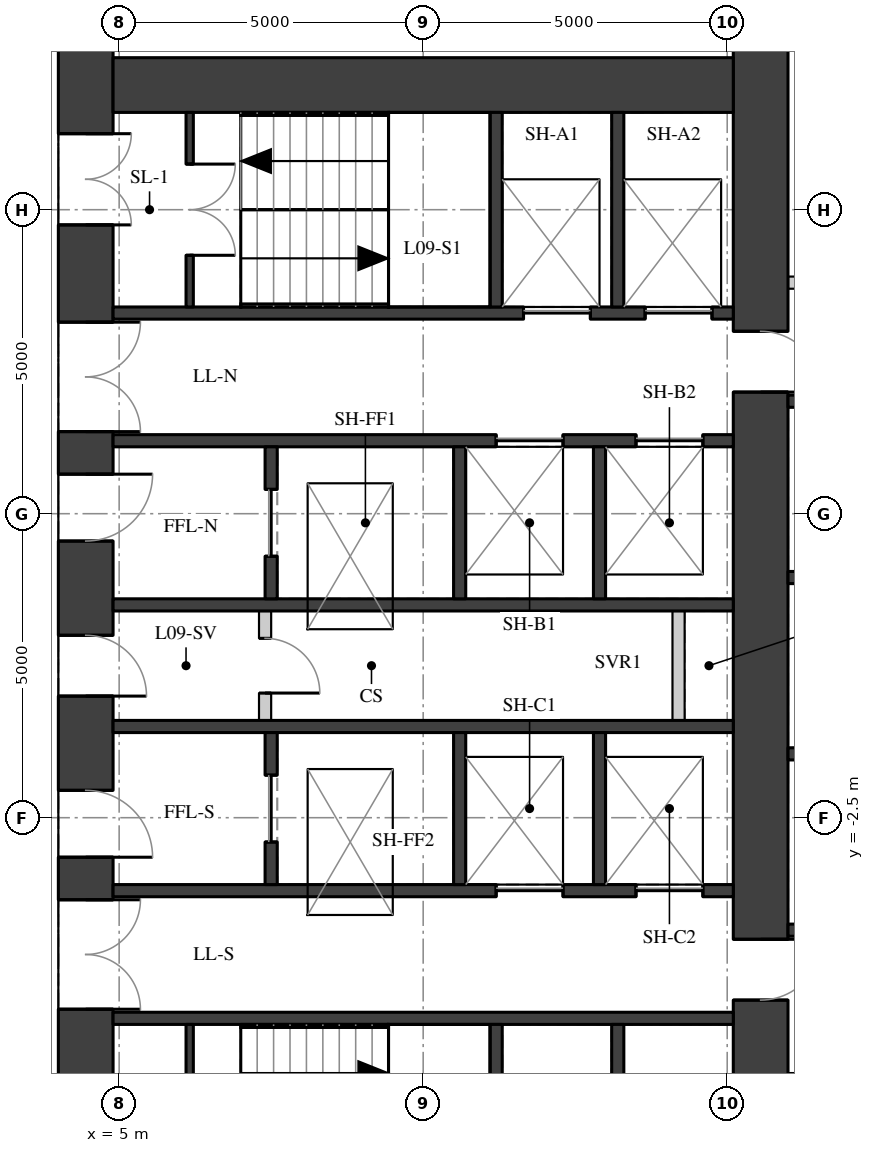
"""IFC4 building model, lengths in metres.
Left out: names, types, materials, properties, quantities, classifications, styles, units other than length and angle.
Written with IfcOpenShell. Run it as: python <this file> out.ifc"""

import sys

from ifc_helpers import new_model, si_unit, direction, frame, frame_2d, origin, place, context, subcontext, project, spatial, rectangle, extrude, element, fill, save


model = new_model("IFC4")
c1 = context("Model", 3, precision=1e-05, world=origin(), true_north=direction((0.0, 1.0)))
c2 = subcontext(c1, "Body", "Model", "MODEL_VIEW")
j1 = project(units=[si_unit("LENGTHUNIT", "METRE"), si_unit("PLANEANGLEUNIT", "RADIAN")], contexts=[c1])
p1 = place(None, origin())
s1 = spatial("IfcSite", under=j1, at=p1, CompositionType="ELEMENT")
p2 = place(p1, origin())
s2 = spatial("IfcBuilding", under=s1, at=p2, CompositionType="ELEMENT")
p3 = place(p2, frame((0.0, 0.0, 38.2)))
s3 = spatial("IfcBuildingStorey", under=s2, at=p3, CompositionType="ELEMENT", Elevation=38.2)
p4 = place(p3, frame((4.45, -11.1, 0.0), z_axis=(0.0, 0.0, 1.0), x_axis=(0.0, 1.0, 0.0)))
e1 = element("IfcWall", 1, at=p4, inside=s3, PredefinedType="SHEAR", context=c2, shape_type="SweptSolid", body=[
    extrude(rectangle(XDim=22.2, YDim=0.9, at=frame_2d((11.1, 0.0))), origin(), (0.0, 0.0, 1.0), 3.02),
])
p5 = place(p4, frame((2.35, 0.0, 0.0)))
e2 = element("IfcOpeningElement", 2, at=p5, cuts=e1, PredefinedType="OPENING", context=c2, shape_type="SweptSolid", body=[
    extrude(rectangle(XDim=1.5, YDim=2.1, at=frame_2d((0.75, 1.05))), frame((0.0, 0.46, 0.0), z_axis=(0.0, -1.0, 0.0), x_axis=(1.0, 0.0, 0.0)), (0.0, 0.0, 1.0), 0.92),
])
p6 = place(p4, frame((5.45, 0.0, 0.0)))
e3 = element("IfcOpeningElement", 3, at=p6, cuts=e1, PredefinedType="OPENING", context=c2, shape_type="SweptSolid", body=[
    extrude(rectangle(XDim=1.8, YDim=2.1, at=frame_2d((0.9, 1.05))), frame((0.0, 0.46, 0.0), z_axis=(0.0, -1.0, 0.0), x_axis=(1.0, 0.0, 0.0)), (0.0, 0.0, 1.0), 0.92),
])
p7 = place(p4, frame((7.95, 0.0, 0.0)))
e4 = element("IfcOpeningElement", 4, at=p7, cuts=e1, PredefinedType="OPENING", context=c2, shape_type="SweptSolid", body=[
    extrude(rectangle(XDim=1.1, YDim=2.1, at=frame_2d((0.55, 1.05))), frame((0.0, 0.46, 0.0), z_axis=(0.0, -1.0, 0.0), x_axis=(1.0, 0.0, 0.0)), (0.0, 0.0, 1.0), 0.92),
])
p8 = place(p4, frame((10.6, 0.0, 0.0)))
e5 = element("IfcOpeningElement", 5, at=p8, cuts=e1, PredefinedType="OPENING", context=c2, shape_type="SweptSolid", body=[
    extrude(rectangle(XDim=1.0, YDim=2.1, at=frame_2d((0.5, 1.05))), frame((0.0, 0.46, 0.0), z_axis=(0.0, -1.0, 0.0), x_axis=(1.0, 0.0, 0.0)), (0.0, 0.0, 1.0), 0.92),
])
p9 = place(p4, frame((13.15, 0.0, 0.0)))
e6 = element("IfcOpeningElement", 6, at=p9, cuts=e1, PredefinedType="OPENING", context=c2, shape_type="SweptSolid", body=[
    extrude(rectangle(XDim=1.1, YDim=2.1, at=frame_2d((0.55, 1.05))), frame((0.0, 0.46, 0.0), z_axis=(0.0, -1.0, 0.0), x_axis=(1.0, 0.0, 0.0)), (0.0, 0.0, 1.0), 0.92),
])
p10 = place(p4, frame((14.95, 0.0, 0.0)))
e7 = element("IfcOpeningElement", 7, at=p10, cuts=e1, PredefinedType="OPENING", context=c2, shape_type="SweptSolid", body=[
    extrude(rectangle(XDim=1.8, YDim=2.1, at=frame_2d((0.9, 1.05))), frame((0.0, 0.46, 0.0), z_axis=(0.0, -1.0, 0.0), x_axis=(1.0, 0.0, 0.0)), (0.0, 0.0, 1.0), 0.92),
])
p11 = place(p4, frame((18.35, 0.0, 0.0)))
e8 = element("IfcOpeningElement", 8, at=p11, cuts=e1, PredefinedType="OPENING", context=c2, shape_type="SweptSolid", body=[
    extrude(rectangle(XDim=1.5, YDim=2.1, at=frame_2d((0.75, 1.05))), frame((0.0, 0.46, 0.0), z_axis=(0.0, -1.0, 0.0), x_axis=(1.0, 0.0, 0.0)), (0.0, 0.0, 1.0), 0.92),
])
p12 = place(p3, frame((15.55, -11.1, 0.0), z_axis=(0.0, 0.0, 1.0), x_axis=(0.0, 1.0, 0.0)))
e9 = element("IfcWall", 9, at=p12, inside=s3, PredefinedType="SHEAR", context=c2, shape_type="SweptSolid", body=[
    extrude(rectangle(XDim=22.2, YDim=0.9, at=frame_2d((11.1, 0.0))), origin(), (0.0, 0.0, 1.0), 3.02),
])
p13 = place(p12, frame((15.6, 0.0, 0.0)))
e10 = element("IfcOpeningElement", 10, at=p13, cuts=e9, PredefinedType="OPENING", context=c2, shape_type="SweptSolid", body=[
    extrude(rectangle(XDim=1.0, YDim=2.1, at=frame_2d((0.5, 1.05))), frame((0.0, 0.46, 0.0), z_axis=(0.0, -1.0, 0.0), x_axis=(1.0, 0.0, 0.0)), (0.0, 0.0, 1.0), 0.92),
])
p14 = place(p12, frame((5.6, 0.0, 0.0)))
e11 = element("IfcOpeningElement", 11, at=p14, cuts=e9, PredefinedType="OPENING", context=c2, shape_type="SweptSolid", body=[
    extrude(rectangle(XDim=1.0, YDim=2.1, at=frame_2d((0.5, 1.05))), frame((0.0, 0.46, 0.0), z_axis=(0.0, -1.0, 0.0), x_axis=(1.0, 0.0, 0.0)), (0.0, 0.0, 1.0), 0.92),
])
p15 = place(p3, frame((4.9, 9.55, 0.0), z_axis=(0.0, 0.0, 1.0), x_axis=(1.0, 0.0, 0.0)))
e12 = element("IfcWall", 12, at=p15, inside=s3, PredefinedType="SHEAR", context=c2, shape_type="SweptSolid", body=[
    extrude(rectangle(XDim=10.2, YDim=0.9, at=frame_2d((5.1, 0.0))), origin(), (0.0, 0.0, 1.0), 3.02),
])
p16 = place(p3, frame((4.9, 5.8, 0.0), z_axis=(0.0, 0.0, 1.0), x_axis=(1.0, 0.0, 0.0)))
e13 = element("IfcWall", 13, at=p16, inside=s3, PredefinedType="SHEAR", context=c2, shape_type="SweptSolid", body=[
    extrude(rectangle(XDim=10.2, YDim=0.2, at=frame_2d((5.1, 0.0))), origin(), (0.0, 0.0, 1.0), 3.02),
])
p17 = place(p16, frame((6.75, 0.0, 0.0)))
e14 = element("IfcOpeningElement", 14, at=p17, cuts=e13, PredefinedType="OPENING", context=c2, shape_type="SweptSolid", body=[
    extrude(rectangle(XDim=1.1, YDim=2.1, at=frame_2d((0.55, 1.05))), frame((0.0, 0.11, 0.0), z_axis=(0.0, -1.0, 0.0), x_axis=(1.0, 0.0, 0.0)), (0.0, 0.0, 1.0), 0.22),
])
p18 = place(p16, frame((8.75, 0.0, 0.0)))
e15 = element("IfcOpeningElement", 15, at=p18, cuts=e13, PredefinedType="OPENING", context=c2, shape_type="SweptSolid", body=[
    extrude(rectangle(XDim=1.1, YDim=2.1, at=frame_2d((0.55, 1.05))), frame((0.0, 0.11, 0.0), z_axis=(0.0, -1.0, 0.0), x_axis=(1.0, 0.0, 0.0)), (0.0, 0.0, 1.0), 0.22),
])
p19 = place(p3, frame((4.9, 3.7, 0.0), z_axis=(0.0, 0.0, 1.0), x_axis=(1.0, 0.0, 0.0)))
e16 = element("IfcWall", 16, at=p19, inside=s3, PredefinedType="SHEAR", context=c2, shape_type="SweptSolid", body=[
    extrude(rectangle(XDim=10.2, YDim=0.2, at=frame_2d((5.1, 0.0))), origin(), (0.0, 0.0, 1.0), 3.02),
])
p20 = place(p19, frame((6.3, 0.0, 0.0)))
e17 = element("IfcOpeningElement", 17, at=p20, cuts=e16, PredefinedType="OPENING", context=c2, shape_type="SweptSolid", body=[
    extrude(rectangle(XDim=1.1, YDim=2.1, at=frame_2d((0.55, 1.05))), frame((0.0, 0.11, 0.0), z_axis=(0.0, -1.0, 0.0), x_axis=(1.0, 0.0, 0.0)), (0.0, 0.0, 1.0), 0.22),
])
p21 = place(p19, frame((8.6, 0.0, 0.0)))
e18 = element("IfcOpeningElement", 18, at=p21, cuts=e16, PredefinedType="OPENING", context=c2, shape_type="SweptSolid", body=[
    extrude(rectangle(XDim=1.1, YDim=2.1, at=frame_2d((0.55, 1.05))), frame((0.0, 0.11, 0.0), z_axis=(0.0, -1.0, 0.0), x_axis=(1.0, 0.0, 0.0)), (0.0, 0.0, 1.0), 0.22),
])
for number, where, z_axis, x_axis in (
    (19, (4.9, 1.0, 0.0), (0.0, 0.0, 1.0), (1.0, 0.0, 0.0)),
    (20, (4.9, -1.0, 0.0), (0.0, 0.0, 1.0), (1.0, 0.0, 0.0)),
):
    element("IfcWall", number, at=place(p3, frame(where, z_axis=z_axis, x_axis=x_axis)), inside=s3, PredefinedType="SHEAR", context=c2, shape_type="SweptSolid", body=[
        extrude(rectangle(XDim=10.2, YDim=0.2, at=frame_2d((5.1, 0.0))), origin(), (0.0, 0.0, 1.0), 3.02),
    ])
p22 = place(p3, frame((4.9, -3.7, 0.0), z_axis=(0.0, 0.0, 1.0), x_axis=(1.0, 0.0, 0.0)))
e21 = element("IfcWall", 21, at=p22, inside=s3, PredefinedType="SHEAR", context=c2, shape_type="SweptSolid", body=[
    extrude(rectangle(XDim=10.2, YDim=0.2, at=frame_2d((5.1, 0.0))), origin(), (0.0, 0.0, 1.0), 3.02),
])
p23 = place(p22, frame((6.3, 0.0, 0.0)))
e22 = element("IfcOpeningElement", 22, at=p23, cuts=e21, PredefinedType="OPENING", context=c2, shape_type="SweptSolid", body=[
    extrude(rectangle(XDim=1.1, YDim=2.1, at=frame_2d((0.55, 1.05))), frame((0.0, 0.11, 0.0), z_axis=(0.0, -1.0, 0.0), x_axis=(1.0, 0.0, 0.0)), (0.0, 0.0, 1.0), 0.22),
])
p24 = place(p22, frame((8.6, 0.0, 0.0)))
e23 = element("IfcOpeningElement", 23, at=p24, cuts=e21, PredefinedType="OPENING", context=c2, shape_type="SweptSolid", body=[
    extrude(rectangle(XDim=1.1, YDim=2.1, at=frame_2d((0.55, 1.05))), frame((0.0, 0.11, 0.0), z_axis=(0.0, -1.0, 0.0), x_axis=(1.0, 0.0, 0.0)), (0.0, 0.0, 1.0), 0.22),
])
p25 = place(p3, frame((4.9, -5.8, 0.0), z_axis=(0.0, 0.0, 1.0), x_axis=(1.0, 0.0, 0.0)))
e24 = element("IfcWall", 24, at=p25, inside=s3, PredefinedType="SHEAR", context=c2, shape_type="SweptSolid", body=[
    extrude(rectangle(XDim=10.2, YDim=0.2, at=frame_2d((5.1, 0.0))), origin(), (0.0, 0.0, 1.0), 3.02),
])
for number, where, z_axis, x_axis in (
    (25, (11.2, 5.9, 0.0), (0.0, 0.0, 1.0), (0.0, 1.0, 0.0)),
    (26, (11.2, -9.1, 0.0), (0.0, 0.0, 1.0), (0.0, 1.0, 0.0)),
    (27, (13.2, 5.9, 0.0), (0.0, 0.0, 1.0), (0.0, 1.0, 0.0)),
    (28, (13.2, -9.1, 0.0), (0.0, 0.0, 1.0), (0.0, 1.0, 0.0)),
):
    element("IfcWall", number, at=place(p3, frame(where, z_axis=z_axis, x_axis=x_axis)), inside=s3, PredefinedType="SHEAR", context=c2, shape_type="SweptSolid", body=[
        extrude(rectangle(XDim=3.2, YDim=0.2, at=frame_2d((1.6, 0.0))), origin(), (0.0, 0.0, 1.0), 3.02),
    ])
p26 = place(p3, frame((7.5, 1.1, 0.0), z_axis=(0.0, 0.0, 1.0), x_axis=(0.0, 1.0, 0.0)))
e29 = element("IfcWall", 29, at=p26, inside=s3, PredefinedType="SHEAR", context=c2, shape_type="SweptSolid", body=[
    extrude(rectangle(XDim=2.5, YDim=0.2, at=frame_2d((1.25, 0.0))), origin(), (0.0, 0.0, 1.0), 3.02),
])
p27 = place(p26, frame((0.7, 0.0, 0.0)))
e30 = element("IfcOpeningElement", 30, at=p27, cuts=e29, PredefinedType="OPENING", context=c2, shape_type="SweptSolid", body=[
    extrude(rectangle(XDim=1.1, YDim=2.1, at=frame_2d((0.55, 1.05))), frame((0.0, 0.11, 0.0), z_axis=(0.0, -1.0, 0.0), x_axis=(1.0, 0.0, 0.0)), (0.0, 0.0, 1.0), 0.22),
])
p28 = place(p3, frame((7.5, -3.6, 0.0), z_axis=(0.0, 0.0, 1.0), x_axis=(0.0, 1.0, 0.0)))
e31 = element("IfcWall", 31, at=p28, inside=s3, PredefinedType="SHEAR", context=c2, shape_type="SweptSolid", body=[
    extrude(rectangle(XDim=2.5, YDim=0.2, at=frame_2d((1.25, 0.0))), origin(), (0.0, 0.0, 1.0), 3.02),
])
p29 = place(p28, frame((0.7, 0.0, 0.0)))
e32 = element("IfcOpeningElement", 32, at=p29, cuts=e31, PredefinedType="OPENING", context=c2, shape_type="SweptSolid", body=[
    extrude(rectangle(XDim=1.1, YDim=2.1, at=frame_2d((0.55, 1.05))), frame((0.0, 0.11, 0.0), z_axis=(0.0, -1.0, 0.0), x_axis=(1.0, 0.0, 0.0)), (0.0, 0.0, 1.0), 0.22),
])
for number, where, z_axis, x_axis in (
    (33, (10.6, 1.1, 0.0), (0.0, 0.0, 1.0), (0.0, 1.0, 0.0)),
    (34, (10.6, -3.6, 0.0), (0.0, 0.0, 1.0), (0.0, 1.0, 0.0)),
    (35, (12.9, 1.1, 0.0), (0.0, 0.0, 1.0), (0.0, 1.0, 0.0)),
    (36, (12.9, -3.6, 0.0), (0.0, 0.0, 1.0), (0.0, 1.0, 0.0)),
):
    element("IfcWall", number, at=place(p3, frame(where, z_axis=z_axis, x_axis=x_axis)), inside=s3, PredefinedType="SHEAR", context=c2, shape_type="SweptSolid", body=[
        extrude(rectangle(XDim=2.5, YDim=0.2, at=frame_2d((1.25, 0.0))), origin(), (0.0, 0.0, 1.0), 3.02),
    ])
p30 = place(p3, frame((6.16, 5.9, 0.0), z_axis=(0.0, 0.0, 1.0), x_axis=(0.0, 1.0, 0.0)))
e37 = element("IfcWall", 37, at=p30, inside=s3, PredefinedType="SHEAR", context=c2, shape_type="SweptSolid", body=[
    extrude(rectangle(XDim=3.2, YDim=0.12, at=frame_2d((1.6, 0.0))), origin(), (0.0, 0.0, 1.0), 3.02),
])
p31 = place(p30, frame((0.85, 0.0, 0.0)))
e38 = element("IfcOpeningElement", 38, at=p31, cuts=e37, PredefinedType="OPENING", context=c2, shape_type="SweptSolid", body=[
    extrude(rectangle(XDim=1.5, YDim=2.1, at=frame_2d((0.75, 1.05))), frame((0.0, 0.07, 0.0), z_axis=(0.0, -1.0, 0.0), x_axis=(1.0, 0.0, 0.0)), (0.0, 0.0, 1.0), 0.14),
])
p32 = place(p3, frame((6.16, -9.1, 0.0), z_axis=(0.0, 0.0, 1.0), x_axis=(0.0, 1.0, 0.0)))
e39 = element("IfcWall", 39, at=p32, inside=s3, PredefinedType="SHEAR", context=c2, shape_type="SweptSolid", body=[
    extrude(rectangle(XDim=3.2, YDim=0.12, at=frame_2d((1.6, 0.0))), origin(), (0.0, 0.0, 1.0), 3.02),
])
p33 = place(p32, frame((0.85, 0.0, 0.0)))
e40 = element("IfcOpeningElement", 40, at=p33, cuts=e39, PredefinedType="OPENING", context=c2, shape_type="SweptSolid", body=[
    extrude(rectangle(XDim=1.5, YDim=2.1, at=frame_2d((0.75, 1.05))), frame((0.0, 0.07, 0.0), z_axis=(0.0, -1.0, 0.0), x_axis=(1.0, 0.0, 0.0)), (0.0, 0.0, 1.0), 0.14),
])
p34 = place(p3, frame((7.4, -0.9, 0.0), z_axis=(0.0, 0.0, 1.0), x_axis=(0.0, 1.0, 0.0)))
e41 = element("IfcWall", 41, at=p34, inside=s3, PredefinedType="PARTITIONING", context=c2, shape_type="SweptSolid", body=[
    extrude(rectangle(XDim=1.8, YDim=0.2, at=frame_2d((0.9, 0.0))), origin(), (0.0, 0.0, 1.0), 3.02),
])
p35 = place(p34, frame((0.45, 0.0, 0.0)))
e42 = element("IfcOpeningElement", 42, at=p35, cuts=e41, PredefinedType="OPENING", context=c2, shape_type="SweptSolid", body=[
    extrude(rectangle(XDim=0.9, YDim=2.1, at=frame_2d((0.45, 1.05))), frame((0.0, 0.11, 0.0), z_axis=(0.0, -1.0, 0.0), x_axis=(1.0, 0.0, 0.0)), (0.0, 0.0, 1.0), 0.22),
])
p36 = place(p3, frame((14.2, -0.9, 0.0), z_axis=(0.0, 0.0, 1.0), x_axis=(0.0, 1.0, 0.0)))
e43 = element("IfcWall", 43, at=p36, inside=s3, PredefinedType="PARTITIONING", context=c2, shape_type="SweptSolid", body=[
    extrude(rectangle(XDim=1.8, YDim=0.2, at=frame_2d((0.9, 0.0))), origin(), (0.0, 0.0, 1.0), 3.02),
])
for number, where, z_axis, x_axis in (
    (44, (16.0, -4.35, 0.0), (0.0, 0.0, 1.0), (1.0, 0.0, 0.0)),
    (45, (16.0, -1.45, 0.0), (0.0, 0.0, 1.0), (1.0, 0.0, 0.0)),
    (46, (16.0, 1.45, 0.0), (0.0, 0.0, 1.0), (1.0, 0.0, 0.0)),
    (47, (16.0, 4.35, 0.0), (0.0, 0.0, 1.0), (1.0, 0.0, 0.0)),
):
    element("IfcWall", number, at=place(p3, frame(where, z_axis=z_axis, x_axis=x_axis)), inside=s3, PredefinedType="SHEAR", context=c2, shape_type="SweptSolid", body=[
        extrude(rectangle(XDim=2.3, YDim=0.2, at=frame_2d((1.15, 0.0))), origin(), (0.0, 0.0, 1.0), 3.02),
    ])
p37 = place(p3, frame((16.0, 6.3, 0.0), z_axis=(0.0, 0.0, 1.0), x_axis=(1.0, 0.0, 0.0)))
e48 = element("IfcWall", 48, at=p37, inside=s3, PredefinedType="PARTITIONING", context=c2, shape_type="SweptSolid", body=[
    extrude(rectangle(XDim=2.3, YDim=0.2, at=frame_2d((1.15, 0.0))), origin(), (0.0, 0.0, 1.0), 3.02),
])
p38 = place(p37, frame((0.3, 0.0, 0.0)))
e49 = element("IfcOpeningElement", 49, at=p38, cuts=e48, PredefinedType="OPENING", context=c2, shape_type="SweptSolid", body=[
    extrude(rectangle(XDim=0.9, YDim=2.1, at=frame_2d((0.45, 1.05))), frame((0.0, 0.11, 0.0), z_axis=(0.0, -1.0, 0.0), x_axis=(1.0, 0.0, 0.0)), (0.0, 0.0, 1.0), 0.22),
])
p39 = place(p6, origin())
e50 = element("IfcDoor", 50, at=p39, inside=s3, OperationType="DOUBLE_DOOR_SINGLE_SWING", PredefinedType="DOOR", context=c2, shape_type="SweptSolid", body=[
    extrude(rectangle(XDim=1.8, YDim=2.1, at=frame_2d((0.9, 1.05))), frame((0.0, 0.025, 0.0), z_axis=(0.0, -1.0, 0.0), x_axis=(1.0, 0.0, 0.0)), (0.0, 0.0, 1.0), 0.05),
])
fill(e3, e50)
p40 = place(p7, origin())
e51 = element("IfcDoor", 51, at=p40, inside=s3, OperationType="SINGLE_SWING_RIGHT", PredefinedType="DOOR", context=c2, shape_type="SweptSolid", body=[
    extrude(rectangle(XDim=1.1, YDim=2.1, at=frame_2d((0.55, 1.05))), frame((0.0, 0.025, 0.0), z_axis=(0.0, -1.0, 0.0), x_axis=(1.0, 0.0, 0.0)), (0.0, 0.0, 1.0), 0.05),
])
fill(e4, e51)
p41 = place(p8, origin())
e52 = element("IfcDoor", 52, at=p41, inside=s3, OperationType="SINGLE_SWING_RIGHT", PredefinedType="DOOR", context=c2, shape_type="SweptSolid", body=[
    extrude(rectangle(XDim=1.0, YDim=2.1, at=frame_2d((0.5, 1.05))), frame((0.0, 0.025, 0.0), z_axis=(0.0, -1.0, 0.0), x_axis=(1.0, 0.0, 0.0)), (0.0, 0.0, 1.0), 0.05),
])
fill(e5, e52)
p42 = place(p9, origin())
e53 = element("IfcDoor", 53, at=p42, inside=s3, OperationType="SINGLE_SWING_LEFT", PredefinedType="DOOR", context=c2, shape_type="SweptSolid", body=[
    extrude(rectangle(XDim=1.1, YDim=2.1, at=frame_2d((0.55, 1.05))), frame((0.0, 0.025, 0.0), z_axis=(0.0, -1.0, 0.0), x_axis=(1.0, 0.0, 0.0)), (0.0, 0.0, 1.0), 0.05),
])
fill(e6, e53)
p43 = place(p10, origin())
e54 = element("IfcDoor", 54, at=p43, inside=s3, OperationType="DOUBLE_DOOR_SINGLE_SWING", PredefinedType="DOOR", context=c2, shape_type="SweptSolid", body=[
    extrude(rectangle(XDim=1.8, YDim=2.1, at=frame_2d((0.9, 1.05))), frame((0.0, 0.025, 0.0), z_axis=(0.0, -1.0, 0.0), x_axis=(1.0, 0.0, 0.0)), (0.0, 0.0, 1.0), 0.05),
])
fill(e7, e54)
p44 = place(p11, origin())
e55 = element("IfcDoor", 55, at=p44, inside=s3, OperationType="DOUBLE_DOOR_SINGLE_SWING", PredefinedType="DOOR", context=c2, shape_type="SweptSolid", body=[
    extrude(rectangle(XDim=1.5, YDim=2.1, at=frame_2d((0.75, 1.05))), frame((0.0, 0.025, 0.0), z_axis=(0.0, -1.0, 0.0), x_axis=(1.0, 0.0, 0.0)), (0.0, 0.0, 1.0), 0.05),
])
fill(e8, e55)
p45 = place(p31, origin())
e56 = element("IfcDoor", 56, at=p45, inside=s3, OperationType="DOUBLE_DOOR_SINGLE_SWING", PredefinedType="DOOR", context=c2, shape_type="SweptSolid", body=[
    extrude(rectangle(XDim=1.5, YDim=2.1, at=frame_2d((0.75, 1.05))), frame((0.0, 0.025, 0.0), z_axis=(0.0, -1.0, 0.0), x_axis=(1.0, 0.0, 0.0)), (0.0, 0.0, 1.0), 0.05),
])
fill(e38, e56)
p46 = place(p17, origin())
e57 = element("IfcDoor", 57, at=p46, inside=s3, OperationType="DOUBLE_DOOR_SLIDING", PredefinedType="DOOR", context=c2, shape_type="SweptSolid", body=[
    extrude(rectangle(XDim=1.1, YDim=2.1, at=frame_2d((0.55, 1.05))), frame((0.0, 0.025, 0.0), z_axis=(0.0, -1.0, 0.0), x_axis=(1.0, 0.0, 0.0)), (0.0, 0.0, 1.0), 0.05),
])
fill(e14, e57)
p47 = place(p18, origin())
e58 = element("IfcDoor", 58, at=p47, inside=s3, OperationType="DOUBLE_DOOR_SLIDING", PredefinedType="DOOR", context=c2, shape_type="SweptSolid", body=[
    extrude(rectangle(XDim=1.1, YDim=2.1, at=frame_2d((0.55, 1.05))), frame((0.0, 0.025, 0.0), z_axis=(0.0, -1.0, 0.0), x_axis=(1.0, 0.0, 0.0)), (0.0, 0.0, 1.0), 0.05),
])
fill(e15, e58)
p48 = place(p20, origin())
e59 = element("IfcDoor", 59, at=p48, inside=s3, OperationType="DOUBLE_DOOR_SLIDING", PredefinedType="DOOR", context=c2, shape_type="SweptSolid", body=[
    extrude(rectangle(XDim=1.1, YDim=2.1, at=frame_2d((0.55, 1.05))), frame((0.0, 0.025, 0.0), z_axis=(0.0, -1.0, 0.0), x_axis=(1.0, 0.0, 0.0)), (0.0, 0.0, 1.0), 0.05),
])
fill(e17, e59)
p49 = place(p21, origin())
e60 = element("IfcDoor", 60, at=p49, inside=s3, OperationType="DOUBLE_DOOR_SLIDING", PredefinedType="DOOR", context=c2, shape_type="SweptSolid", body=[
    extrude(rectangle(XDim=1.1, YDim=2.1, at=frame_2d((0.55, 1.05))), frame((0.0, 0.025, 0.0), z_axis=(0.0, -1.0, 0.0), x_axis=(1.0, 0.0, 0.0)), (0.0, 0.0, 1.0), 0.05),
])
fill(e18, e60)
p50 = place(p23, origin())
e61 = element("IfcDoor", 61, at=p50, inside=s3, OperationType="DOUBLE_DOOR_SLIDING", PredefinedType="DOOR", context=c2, shape_type="SweptSolid", body=[
    extrude(rectangle(XDim=1.1, YDim=2.1, at=frame_2d((0.55, 1.05))), frame((0.0, 0.025, 0.0), z_axis=(0.0, -1.0, 0.0), x_axis=(1.0, 0.0, 0.0)), (0.0, 0.0, 1.0), 0.05),
])
fill(e22, e61)
p51 = place(p24, origin())
e62 = element("IfcDoor", 62, at=p51, inside=s3, OperationType="DOUBLE_DOOR_SLIDING", PredefinedType="DOOR", context=c2, shape_type="SweptSolid", body=[
    extrude(rectangle(XDim=1.1, YDim=2.1, at=frame_2d((0.55, 1.05))), frame((0.0, 0.025, 0.0), z_axis=(0.0, -1.0, 0.0), x_axis=(1.0, 0.0, 0.0)), (0.0, 0.0, 1.0), 0.05),
])
fill(e23, e62)
p52 = place(p27, origin())
e63 = element("IfcDoor", 63, at=p52, inside=s3, OperationType="DOUBLE_DOOR_SLIDING", PredefinedType="DOOR", context=c2, shape_type="SweptSolid", body=[
    extrude(rectangle(XDim=1.1, YDim=2.1, at=frame_2d((0.55, 1.05))), frame((0.0, 0.025, 0.0), z_axis=(0.0, -1.0, 0.0), x_axis=(1.0, 0.0, 0.0)), (0.0, 0.0, 1.0), 0.05),
])
fill(e30, e63)
p53 = place(p29, origin())
e64 = element("IfcDoor", 64, at=p53, inside=s3, OperationType="DOUBLE_DOOR_SLIDING", PredefinedType="DOOR", context=c2, shape_type="SweptSolid", body=[
    extrude(rectangle(XDim=1.1, YDim=2.1, at=frame_2d((0.55, 1.05))), frame((0.0, 0.025, 0.0), z_axis=(0.0, -1.0, 0.0), x_axis=(1.0, 0.0, 0.0)), (0.0, 0.0, 1.0), 0.05),
])
fill(e32, e64)
p54 = place(p35, origin())
e65 = element("IfcDoor", 65, at=p54, inside=s3, OperationType="SINGLE_SWING_RIGHT", PredefinedType="DOOR", context=c2, shape_type="SweptSolid", body=[
    extrude(rectangle(XDim=0.9, YDim=2.1, at=frame_2d((0.45, 1.05))), frame((0.0, 0.025, 0.0), z_axis=(0.0, -1.0, 0.0), x_axis=(1.0, 0.0, 0.0)), (0.0, 0.0, 1.0), 0.05),
])
fill(e42, e65)
p55 = place(p13, origin())
e66 = element("IfcDoor", 66, at=p55, inside=s3, OperationType="SINGLE_SWING_RIGHT", PredefinedType="DOOR", context=c2, shape_type="SweptSolid", body=[
    extrude(rectangle(XDim=1.0, YDim=2.1, at=frame_2d((0.5, 1.05))), frame((0.0, 0.025, 0.0), z_axis=(0.0, -1.0, 0.0), x_axis=(1.0, 0.0, 0.0)), (0.0, 0.0, 1.0), 0.05),
])
fill(e10, e66)
p56 = place(p14, origin())
e67 = element("IfcDoor", 67, at=p56, inside=s3, OperationType="SINGLE_SWING_LEFT", PredefinedType="DOOR", context=c2, shape_type="SweptSolid", body=[
    extrude(rectangle(XDim=1.0, YDim=2.1, at=frame_2d((0.5, 1.05))), frame((0.0, 0.025, 0.0), z_axis=(0.0, -1.0, 0.0), x_axis=(1.0, 0.0, 0.0)), (0.0, 0.0, 1.0), 0.05),
])
fill(e11, e67)
save(model, sys.argv[1])
